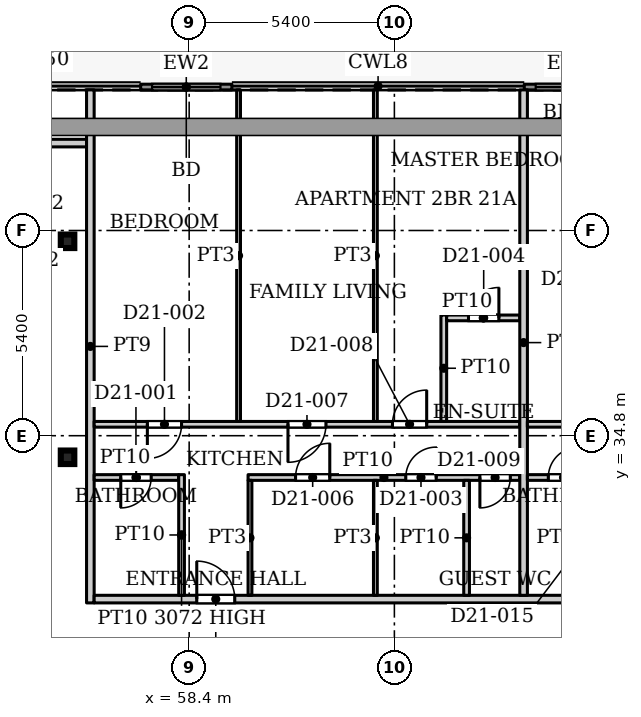
"""IFC4 building model, lengths in metres.
Left out: names, types, materials, properties, quantities, classifications, styles, units other than length and angle.
Written with IfcOpenShell. Run it as: python <this file> out.ifc"""

import sys

from ifc_helpers import new_model, si_unit, direction, frame, frame_2d, origin, origin_2d, place, context, subcontext, project, spatial, rectangle, hollow_rectangle, extrude, source, transform, mapped, element, fill, save


model = new_model("IFC4")
c1 = context("Model", 3, precision=1e-05, world=origin(), true_north=direction((0.0, 1.0)))
c2 = subcontext(c1, "Body", "Model", "MODEL_VIEW")
j1 = project(units=[si_unit("LENGTHUNIT", "METRE"), si_unit("PLANEANGLEUNIT", "RADIAN")], contexts=[c1])
p1 = place(None, origin())
s1 = spatial("IfcSite", under=j1, at=p1, CompositionType="ELEMENT")
p2 = place(p1, origin())
s2 = spatial("IfcBuilding", under=s1, at=p2, CompositionType="ELEMENT")
p3 = place(p2, frame((0.0, 0.0, 94.1)))
s3 = spatial("IfcBuildingStorey", under=s2, at=p3, CompositionType="ELEMENT", Elevation=94.1)
for number, where, z_axis, x_axis in (
    (1, (55.2, 34.232, 0.0), (0.0, 0.0, 1.0), (1.0, 0.0, 0.0)),
    (2, (55.2, 39.916, 0.0), (0.0, 0.0, 1.0), (1.0, 0.0, 0.0)),
):
    element("IfcColumn", number, at=place(p3, frame(where, z_axis=z_axis, x_axis=x_axis)), inside=s3, PredefinedType="COLUMN", context=c2, shape_type="SweptSolid", body=[
        extrude(hollow_rectangle(XDim=0.356, YDim=0.356, WallThickness=0.016, InnerFilletRadius=0.016, OuterFilletRadius=0.032, at=origin_2d()), origin(), (0.0, 0.0, 1.0), 3.9),
    ])
p4 = place(p3, frame((57.124, 43.975, 0.0), z_axis=(0.0, 0.0, 1.0), x_axis=(1.0, 0.0, 0.0)))
e3 = element("IfcWall", 3, at=p4, inside=s3, PredefinedType="SOLIDWALL", context=c2, shape_type="SweptSolid", body=[
    extrude(rectangle(XDim=2.4, YDim=0.15, at=frame_2d((1.2, 0.0))), origin(), (0.0, 0.0, 1.0), 3.75),
])
p5 = place(p4, frame((0.3, 0.0, 0.0)))
e4 = element("IfcOpeningElement", 4, at=p5, cuts=e3, PredefinedType="OPENING", context=c2, shape_type="SweptSolid", body=[
    extrude(rectangle(XDim=1.8, YDim=2.4, at=frame_2d((0.9, 1.2))), frame((0.0, 0.085, 0.0), z_axis=(0.0, -1.0, 0.0), x_axis=(1.0, 0.0, 0.0)), (0.0, 0.0, 1.0), 0.17),
])
p6 = place(p3, frame((67.218, 43.975, 0.0), z_axis=(0.0, 0.0, 1.0), x_axis=(1.0, 0.0, 0.0)))
e5 = element("IfcWall", 5, at=p6, inside=s3, PredefinedType="SOLIDWALL", context=c2, shape_type="SweptSolid", body=[
    extrude(rectangle(XDim=2.4, YDim=0.15, at=frame_2d((1.2, 0.0))), origin(), (0.0, 0.0, 1.0), 3.75),
])
p7 = place(p6, frame((0.3, 0.0, 0.0)))
e6 = element("IfcOpeningElement", 6, at=p7, cuts=e5, PredefinedType="OPENING", context=c2, shape_type="SweptSolid", body=[
    extrude(rectangle(XDim=1.8, YDim=2.4, at=frame_2d((0.9, 1.2))), frame((0.0, 0.085, 0.0), z_axis=(0.0, -1.0, 0.0), x_axis=(1.0, 0.0, 0.0)), (0.0, 0.0, 1.0), 0.17),
])
p8 = place(p3, frame((53.5, 42.5, 0.0), z_axis=(0.0, 0.0, 1.0), x_axis=(1.0, 0.0, 0.0)))
e7 = element("IfcWall", 7, at=p8, inside=s3, PredefinedType="PARTITIONING", context=c2, shape_type="SweptSolid", body=[
    extrude(rectangle(XDim=2.2, YDim=0.2, at=frame_2d((1.1, 0.0))), origin(), (0.0, 0.0, 1.0), 3.6),
])
p9 = place(p8, frame((0.15, 0.0, 0.0)))
e8 = element("IfcOpeningElement", 8, at=p9, cuts=e7, PredefinedType="OPENING", context=c2, shape_type="SweptSolid", body=[
    extrude(rectangle(XDim=1.0, YDim=2.1, at=frame_2d((0.5, 1.05))), frame((0.0, 0.11, 0.0), z_axis=(0.0, -1.0, 0.0), x_axis=(1.0, 0.0, 0.0)), (0.0, 0.0, 1.0), 0.22),
])
p10 = place(p3, frame((55.8, 30.4, 0.0), z_axis=(0.0, 0.0, 1.0), x_axis=(0.0, 1.0, 0.0)))
e9 = element("IfcWall", 9, at=p10, inside=s3, PredefinedType="PARTITIONING", context=c2, shape_type="SweptSolid", body=[
    extrude(rectangle(XDim=13.5, YDim=0.2, at=frame_2d((6.75, 0.0))), origin(), (0.0, 0.0, 1.0), 3.6),
])
p11 = place(p3, frame((55.9, 30.5, 0.0), z_axis=(0.0, 0.0, 1.0), x_axis=(1.0, 0.0, 0.0)))
e10 = element("IfcWall", 10, at=p11, inside=s3, PredefinedType="PARTITIONING", context=c2, shape_type="SweptSolid", body=[
    extrude(rectangle(XDim=42.2, YDim=0.2, at=frame_2d((21.1, 0.0))), origin(), (0.0, 0.0, 1.0), 3.6),
])
p12 = place(p11, frame((2.7, 0.0, 0.0)))
e11 = element("IfcOpeningElement", 11, at=p12, cuts=e10, PredefinedType="OPENING", context=c2, shape_type="SweptSolid", body=[
    extrude(rectangle(XDim=1.0, YDim=2.1, at=frame_2d((0.5, 1.05))), frame((0.0, 0.11, 0.0), z_axis=(0.0, -1.0, 0.0), x_axis=(1.0, 0.0, 0.0)), (0.0, 0.0, 1.0), 0.22),
])
p13 = place(p11, frame((15.3, 0.0, 0.0)))
e12 = element("IfcOpeningElement", 12, at=p13, cuts=e10, PredefinedType="OPENING", context=c2, shape_type="SweptSolid", body=[
    extrude(rectangle(XDim=1.0, YDim=2.1, at=frame_2d((0.5, 1.05))), frame((0.0, 0.11, 0.0), z_axis=(0.0, -1.0, 0.0), x_axis=(1.0, 0.0, 0.0)), (0.0, 0.0, 1.0), 0.22),
])
p14 = place(p11, frame((33.3, 0.0, 0.0)))
e13 = element("IfcOpeningElement", 13, at=p14, cuts=e10, PredefinedType="OPENING", context=c2, shape_type="SweptSolid", body=[
    extrude(rectangle(XDim=1.0, YDim=2.1, at=frame_2d((0.5, 1.05))), frame((0.0, 0.11, 0.0), z_axis=(0.0, -1.0, 0.0), x_axis=(1.0, 0.0, 0.0)), (0.0, 0.0, 1.0), 0.22),
])
p15 = place(p3, frame((55.9, 33.7, 0.0), z_axis=(0.0, 0.0, 1.0), x_axis=(1.0, 0.0, 0.0)))
e14 = element("IfcWall", 14, at=p15, inside=s3, PredefinedType="PARTITIONING", context=c2, shape_type="SweptSolid", body=[
    extrude(rectangle(XDim=2.225, YDim=0.15, at=frame_2d((1.113, 0.0))), origin(), (0.0, 0.0, 1.0), 3.6),
])
p16 = place(p15, frame((0.7, 0.0, 0.0)))
e15 = element("IfcOpeningElement", 15, at=p16, cuts=e14, PredefinedType="OPENING", context=c2, shape_type="SweptSolid", body=[
    extrude(rectangle(XDim=0.8, YDim=2.1, at=frame_2d((0.4, 1.05))), frame((0.0, 0.085, 0.0), z_axis=(0.0, -1.0, 0.0), x_axis=(1.0, 0.0, 0.0)), (0.0, 0.0, 1.0), 0.17),
])
p17 = place(p3, frame((55.9, 35.1, 0.0), z_axis=(0.0, 0.0, 1.0), x_axis=(1.0, 0.0, 0.0)))
e16 = element("IfcWall", 16, at=p17, inside=s3, PredefinedType="PARTITIONING", context=c2, shape_type="SweptSolid", body=[
    extrude(rectangle(XDim=11.2, YDim=0.15, at=frame_2d((5.6, 0.0))), origin(), (0.0, 0.0, 1.0), 3.6),
])
p18 = place(p17, frame((1.4, 0.0, 0.0)))
e17 = element("IfcOpeningElement", 17, at=p18, cuts=e16, PredefinedType="OPENING", context=c2, shape_type="SweptSolid", body=[
    extrude(rectangle(XDim=0.9, YDim=2.1, at=frame_2d((0.45, 1.05))), frame((0.0, 0.085, 0.0), z_axis=(0.0, -1.0, 0.0), x_axis=(1.0, 0.0, 0.0)), (0.0, 0.0, 1.0), 0.17),
])
p19 = place(p17, frame((5.1, 0.0, 0.0)))
e18 = element("IfcOpeningElement", 18, at=p19, cuts=e16, PredefinedType="OPENING", context=c2, shape_type="SweptSolid", body=[
    extrude(rectangle(XDim=1.0, YDim=2.1, at=frame_2d((0.5, 1.05))), frame((0.0, 0.085, 0.0), z_axis=(0.0, -1.0, 0.0), x_axis=(1.0, 0.0, 0.0)), (0.0, 0.0, 1.0), 0.17),
])
p20 = place(p17, frame((7.85, 0.0, 0.0)))
e19 = element("IfcOpeningElement", 19, at=p20, cuts=e16, PredefinedType="OPENING", context=c2, shape_type="SweptSolid", body=[
    extrude(rectangle(XDim=0.9, YDim=2.1, at=frame_2d((0.45, 1.05))), frame((0.0, 0.085, 0.0), z_axis=(0.0, -1.0, 0.0), x_axis=(1.0, 0.0, 0.0)), (0.0, 0.0, 1.0), 0.17),
])
p21 = place(p3, frame((58.2, 30.6, 0.0), z_axis=(0.0, 0.0, 1.0), x_axis=(0.0, 1.0, 0.0)))
e20 = element("IfcWall", 20, at=p21, inside=s3, PredefinedType="PARTITIONING", context=c2, shape_type="SweptSolid", body=[
    extrude(rectangle(XDim=3.175, YDim=0.15, at=frame_2d((1.587, 0.0))), origin(), (0.0, 0.0, 1.0), 3.072),
])
p22 = place(p3, frame((59.7, 35.175, 0.0), z_axis=(0.0, 0.0, 1.0), x_axis=(0.0, 1.0, 0.0)))
e21 = element("IfcWall", 21, at=p22, inside=s3, PredefinedType="PARTITIONING", context=c2, shape_type="SweptSolid", body=[
    extrude(rectangle(XDim=8.725, YDim=0.1, at=frame_2d((4.362, 0.0))), origin(), (0.0, 0.0, 1.0), 3.6),
])
p23 = place(p3, frame((59.95, 33.7, 0.0), z_axis=(0.0, 0.0, 1.0), x_axis=(1.0, 0.0, 0.0)))
e22 = element("IfcWall", 22, at=p23, inside=s3, PredefinedType="PARTITIONING", context=c2, shape_type="SweptSolid", body=[
    extrude(rectangle(XDim=7.15, YDim=0.15, at=frame_2d((3.575, 0.0))), origin(), (0.0, 0.0, 1.0), 3.6),
])
p24 = place(p23, frame((4.15, 0.0, 0.0)))
e23 = element("IfcOpeningElement", 23, at=p24, cuts=e22, PredefinedType="OPENING", context=c2, shape_type="SweptSolid", body=[
    extrude(rectangle(XDim=0.8, YDim=2.1, at=frame_2d((0.4, 1.05))), frame((0.0, 0.085, 0.0), z_axis=(0.0, -1.0, 0.0), x_axis=(1.0, 0.0, 0.0)), (0.0, 0.0, 1.0), 0.17),
])
p25 = place(p23, frame((1.25, 0.0, 0.0)))
e24 = element("IfcOpeningElement", 24, at=p25, cuts=e22, PredefinedType="OPENING", context=c2, shape_type="SweptSolid", body=[
    extrude(rectangle(XDim=0.9, YDim=2.1, at=frame_2d((0.45, 1.05))), frame((0.0, 0.085, 0.0), z_axis=(0.0, -1.0, 0.0), x_axis=(1.0, 0.0, 0.0)), (0.0, 0.0, 1.0), 0.17),
])
p26 = place(p23, frame((6.1, 0.0, 0.0)))
e25 = element("IfcOpeningElement", 25, at=p26, cuts=e22, PredefinedType="OPENING", context=c2, shape_type="SweptSolid", body=[
    extrude(rectangle(XDim=0.8, YDim=2.1, at=frame_2d((0.4, 1.05))), frame((0.0, 0.085, 0.0), z_axis=(0.0, -1.0, 0.0), x_axis=(1.0, 0.0, 0.0)), (0.0, 0.0, 1.0), 0.17),
])
for number, where, z_axis, x_axis in (
    (26, (60.0, 30.6, 0.0), (0.0, 0.0, 1.0), (0.0, 1.0, 0.0)),
    (27, (63.3, 30.6, 0.0), (0.0, 0.0, 1.0), (0.0, 1.0, 0.0)),
):
    element("IfcWall", number, at=place(p3, frame(where, z_axis=z_axis, x_axis=x_axis)), inside=s3, PredefinedType="PARTITIONING", context=c2, shape_type="SweptSolid", body=[
        extrude(rectangle(XDim=3.025, YDim=0.1, at=frame_2d((1.512, 0.0))), origin(), (0.0, 0.0, 1.0), 3.6),
    ])
p27 = place(p3, frame((63.3, 35.175, 0.0), z_axis=(0.0, 0.0, 1.0), x_axis=(0.0, 1.0, 0.0)))
e28 = element("IfcWall", 28, at=p27, inside=s3, PredefinedType="PARTITIONING", context=c2, shape_type="SweptSolid", body=[
    extrude(rectangle(XDim=8.725, YDim=0.1, at=frame_2d((4.362, 0.0))), origin(), (0.0, 0.0, 1.0), 3.6),
])
p28 = place(p3, frame((65.1, 35.175, 0.0), z_axis=(0.0, 0.0, 1.0), x_axis=(0.0, 1.0, 0.0)))
e29 = element("IfcWall", 29, at=p28, inside=s3, PredefinedType="PARTITIONING", context=c2, shape_type="SweptSolid", body=[
    extrude(rectangle(XDim=2.8, YDim=0.15, at=frame_2d((1.4, 0.0))), origin(), (0.0, 0.0, 1.0), 3.6),
])
p29 = place(p3, frame((65.175, 37.9, 0.0), z_axis=(0.0, 0.0, 1.0), x_axis=(1.0, 0.0, 0.0)))
e30 = element("IfcWall", 30, at=p29, inside=s3, PredefinedType="PARTITIONING", context=c2, shape_type="SweptSolid", body=[
    extrude(rectangle(XDim=1.925, YDim=0.15, at=frame_2d((0.962, 0.0))), origin(), (0.0, 0.0, 1.0), 3.6),
])
p30 = place(p29, frame((0.575, 0.0, 0.0)))
e31 = element("IfcOpeningElement", 31, at=p30, cuts=e30, PredefinedType="OPENING", context=c2, shape_type="SweptSolid", body=[
    extrude(rectangle(XDim=0.8, YDim=2.1, at=frame_2d((0.4, 1.05))), frame((0.0, 0.085, 0.0), z_axis=(0.0, -1.0, 0.0), x_axis=(1.0, 0.0, 0.0)), (0.0, 0.0, 1.0), 0.17),
])
p31 = place(p3, frame((65.7, 30.6, 0.0), z_axis=(0.0, 0.0, 1.0), x_axis=(0.0, 1.0, 0.0)))
e32 = element("IfcWall", 32, at=p31, inside=s3, PredefinedType="PARTITIONING", context=c2, shape_type="SweptSolid", body=[
    extrude(rectangle(XDim=3.025, YDim=0.15, at=frame_2d((1.512, 0.0))), origin(), (0.0, 0.0, 1.0), 3.6),
])
p32 = place(p3, frame((67.2, 30.6, 0.0), z_axis=(0.0, 0.0, 1.0), x_axis=(0.0, 1.0, 0.0)))
e33 = element("IfcWall", 33, at=p32, inside=s3, PredefinedType="PARTITIONING", context=c2, shape_type="SweptSolid", body=[
    extrude(rectangle(XDim=13.3, YDim=0.2, at=frame_2d((6.65, 0.0))), origin(), (0.0, 0.0, 1.0), 3.6),
])
p33 = place(p3, frame((67.3, 33.7, 0.0), z_axis=(0.0, 0.0, 1.0), x_axis=(1.0, 0.0, 0.0)))
e34 = element("IfcWall", 34, at=p33, inside=s3, PredefinedType="PARTITIONING", context=c2, shape_type="SweptSolid", body=[
    extrude(rectangle(XDim=3.55, YDim=0.15, at=frame_2d((1.775, 0.0))), origin(), (0.0, 0.0, 1.0), 3.6),
])
p34 = place(p33, frame((0.55, 0.0, 0.0)))
e35 = element("IfcOpeningElement", 35, at=p34, cuts=e34, PredefinedType="OPENING", context=c2, shape_type="SweptSolid", body=[
    extrude(rectangle(XDim=0.8, YDim=2.1, at=frame_2d((0.4, 1.05))), frame((0.0, 0.085, 0.0), z_axis=(0.0, -1.0, 0.0), x_axis=(1.0, 0.0, 0.0)), (0.0, 0.0, 1.0), 0.17),
])
p35 = place(p33, frame((2.35, 0.0, 0.0)))
e36 = element("IfcOpeningElement", 36, at=p35, cuts=e34, PredefinedType="OPENING", context=c2, shape_type="SweptSolid", body=[
    extrude(rectangle(XDim=0.8, YDim=2.1, at=frame_2d((0.4, 1.05))), frame((0.0, 0.085, 0.0), z_axis=(0.0, -1.0, 0.0), x_axis=(1.0, 0.0, 0.0)), (0.0, 0.0, 1.0), 0.17),
])
p36 = place(p3, frame((67.3, 35.1, 0.0), z_axis=(0.0, 0.0, 1.0), x_axis=(1.0, 0.0, 0.0)))
e37 = element("IfcWall", 37, at=p36, inside=s3, PredefinedType="PARTITIONING", context=c2, shape_type="SweptSolid", body=[
    extrude(rectangle(XDim=9.7, YDim=0.15, at=frame_2d((4.85, 0.0))), origin(), (0.0, 0.0, 1.0), 3.6),
])
p37 = place(p36, frame((1.0, 0.0, 0.0)))
e38 = element("IfcOpeningElement", 38, at=p37, cuts=e37, PredefinedType="OPENING", context=c2, shape_type="SweptSolid", body=[
    extrude(rectangle(XDim=0.9, YDim=2.1, at=frame_2d((0.45, 1.05))), frame((0.0, 0.085, 0.0), z_axis=(0.0, -1.0, 0.0), x_axis=(1.0, 0.0, 0.0)), (0.0, 0.0, 1.0), 0.17),
])
p38 = place(p36, frame((6.3, 0.0, 0.0)))
e39 = element("IfcOpeningElement", 39, at=p38, cuts=e37, PredefinedType="OPENING", context=c2, shape_type="SweptSolid", body=[
    extrude(rectangle(XDim=1.0, YDim=2.1, at=frame_2d((0.5, 1.05))), frame((0.0, 0.085, 0.0), z_axis=(0.0, -1.0, 0.0), x_axis=(1.0, 0.0, 0.0)), (0.0, 0.0, 1.0), 0.17),
])
m1 = source(origin(), c2, "Body", "SweptSolid", [
    extrude(rectangle(XDim=1.8, YDim=2.4, at=frame_2d((0.9, 1.2))), frame((0.0, 0.025, 0.0), z_axis=(0.0, -1.0, 0.0), x_axis=(1.0, 0.0, 0.0)), (0.0, 0.0, 1.0), 0.05),
])
p39 = place(p5, origin())
e40 = element("IfcDoor", 40, at=p39, inside=s3, OperationType="SLIDING_TO_LEFT", PredefinedType="DOOR", context=c2, shape_type="MappedRepresentation", body=[
    mapped(m1, transform((0.0, 0.0, 0.0), x_axis=(1.0, 0.0, 0.0), y_axis=(0.0, 1.0, 0.0), z_axis=(0.0, 0.0, 1.0), scale=1.0)),
])
fill(e4, e40)
p40 = place(p7, origin())
e41 = element("IfcDoor", 41, at=p40, inside=s3, OperationType="SLIDING_TO_LEFT", PredefinedType="DOOR", context=c2, shape_type="MappedRepresentation", body=[
    mapped(m1, transform((0.0, 0.0, 0.0), x_axis=(1.0, 0.0, 0.0), y_axis=(0.0, 1.0, 0.0), z_axis=(0.0, 0.0, 1.0), scale=1.0)),
])
fill(e6, e41)
m2 = source(origin(), c2, "Body", "SweptSolid", [
    extrude(rectangle(XDim=0.8, YDim=2.1, at=frame_2d((0.4, 1.05))), frame((0.0, 0.025, 0.0), z_axis=(0.0, -1.0, 0.0), x_axis=(1.0, 0.0, 0.0)), (0.0, 0.0, 1.0), 0.05),
])
p41 = place(p16, origin())
e42 = element("IfcDoor", 42, at=p41, inside=s3, OperationType="SINGLE_SWING_RIGHT", PredefinedType="DOOR", context=c2, shape_type="MappedRepresentation", body=[
    mapped(m2, transform((0.0, 0.0, 0.0), x_axis=(1.0, 0.0, 0.0), y_axis=(0.0, 1.0, 0.0), z_axis=(0.0, 0.0, 1.0), scale=1.0)),
])
fill(e15, e42)
m3 = source(origin(), c2, "Body", "SweptSolid", [
    extrude(rectangle(XDim=0.9, YDim=2.1, at=frame_2d((0.45, 1.05))), frame((0.0, 0.025, 0.0), z_axis=(0.0, -1.0, 0.0), x_axis=(1.0, 0.0, 0.0)), (0.0, 0.0, 1.0), 0.05),
])
p42 = place(p18, origin())
e43 = element("IfcDoor", 43, at=p42, inside=s3, OperationType="SINGLE_SWING_RIGHT", PredefinedType="DOOR", context=c2, shape_type="MappedRepresentation", body=[
    mapped(m3, transform((0.0, 0.0, 0.0), x_axis=(1.0, 0.0, 0.0), y_axis=(0.0, 1.0, 0.0), z_axis=(0.0, 0.0, 1.0), scale=1.0)),
])
fill(e17, e43)
p43 = place(p24, origin())
e44 = element("IfcDoor", 44, at=p43, inside=s3, OperationType="SINGLE_SWING_LEFT", PredefinedType="DOOR", context=c2, shape_type="MappedRepresentation", body=[
    mapped(m2, transform((0.0, 0.0, 0.0), x_axis=(1.0, 0.0, 0.0), y_axis=(0.0, 1.0, 0.0), z_axis=(0.0, 0.0, 1.0), scale=1.0)),
])
fill(e23, e44)
p44 = place(p30, origin())
e45 = element("IfcDoor", 45, at=p44, inside=s3, OperationType="SINGLE_SWING_LEFT", PredefinedType="DOOR", context=c2, shape_type="MappedRepresentation", body=[
    mapped(m2, transform((0.0, 0.0, 0.0), x_axis=(1.0, 0.0, 0.0), y_axis=(0.0, 1.0, 0.0), z_axis=(0.0, 0.0, 1.0), scale=1.0)),
])
fill(e31, e45)
m4 = source(origin(), c2, "Body", "SweptSolid", [
    extrude(rectangle(XDim=1.0, YDim=2.1, at=frame_2d((0.5, 1.05))), frame((0.0, 0.025, 0.0), z_axis=(0.0, -1.0, 0.0), x_axis=(1.0, 0.0, 0.0)), (0.0, 0.0, 1.0), 0.05),
])
p45 = place(p12, origin())
e46 = element("IfcDoor", 46, at=p45, inside=s3, OperationType="SINGLE_SWING_LEFT", PredefinedType="DOOR", context=c2, shape_type="MappedRepresentation", body=[
    mapped(m4, transform((0.0, 0.0, 0.0), x_axis=(1.0, 0.0, 0.0), y_axis=(0.0, 1.0, 0.0), z_axis=(0.0, 0.0, 1.0), scale=1.0)),
])
fill(e11, e46)
p46 = place(p25, origin())
e47 = element("IfcDoor", 47, at=p46, inside=s3, OperationType="SINGLE_SWING_LEFT", PredefinedType="DOOR", context=c2, shape_type="MappedRepresentation", body=[
    mapped(m3, transform((0.0, 0.0, 0.0), x_axis=(1.0, 0.0, 0.0), y_axis=(0.0, 1.0, 0.0), z_axis=(0.0, 0.0, 1.0), scale=1.0)),
])
fill(e24, e47)
m5 = source(origin(), c2, "Body", "SweptSolid", [
    extrude(rectangle(XDim=1.0, YDim=2.1, at=frame_2d((0.5, 1.05))), frame((0.0, 0.025, 0.0), z_axis=(0.0, -1.0, 0.0), x_axis=(1.0, 0.0, 0.0)), (0.0, 0.0, 1.0), 0.05),
])
p47 = place(p19, origin())
e48 = element("IfcDoor", 48, at=p47, inside=s3, OperationType="SINGLE_SWING_RIGHT", PredefinedType="DOOR", context=c2, shape_type="MappedRepresentation", body=[
    mapped(m5, transform((0.0, 0.0, 0.0), x_axis=(1.0, 0.0, 0.0), y_axis=(0.0, 1.0, 0.0), z_axis=(0.0, 0.0, 1.0), scale=1.0)),
])
fill(e18, e48)
p48 = place(p20, origin())
e49 = element("IfcDoor", 49, at=p48, inside=s3, OperationType="SINGLE_SWING_LEFT", PredefinedType="DOOR", context=c2, shape_type="MappedRepresentation", body=[
    mapped(m3, transform((0.0, 0.0, 0.0), x_axis=(1.0, 0.0, 0.0), y_axis=(0.0, 1.0, 0.0), z_axis=(0.0, 0.0, 1.0), scale=1.0)),
])
fill(e19, e49)
p49 = place(p26, origin())
e50 = element("IfcDoor", 50, at=p49, inside=s3, OperationType="SINGLE_SWING_RIGHT", PredefinedType="DOOR", context=c2, shape_type="MappedRepresentation", body=[
    mapped(m2, transform((0.0, 0.0, 0.0), x_axis=(1.0, 0.0, 0.0), y_axis=(0.0, 1.0, 0.0), z_axis=(0.0, 0.0, 1.0), scale=1.0)),
])
fill(e25, e50)
p50 = place(p34, origin())
e51 = element("IfcDoor", 51, at=p50, inside=s3, OperationType="SINGLE_SWING_LEFT", PredefinedType="DOOR", context=c2, shape_type="MappedRepresentation", body=[
    mapped(m2, transform((0.0, 0.0, 0.0), x_axis=(1.0, 0.0, 0.0), y_axis=(0.0, 1.0, 0.0), z_axis=(0.0, 0.0, 1.0), scale=1.0)),
])
fill(e35, e51)
save(model, sys.argv[1])
